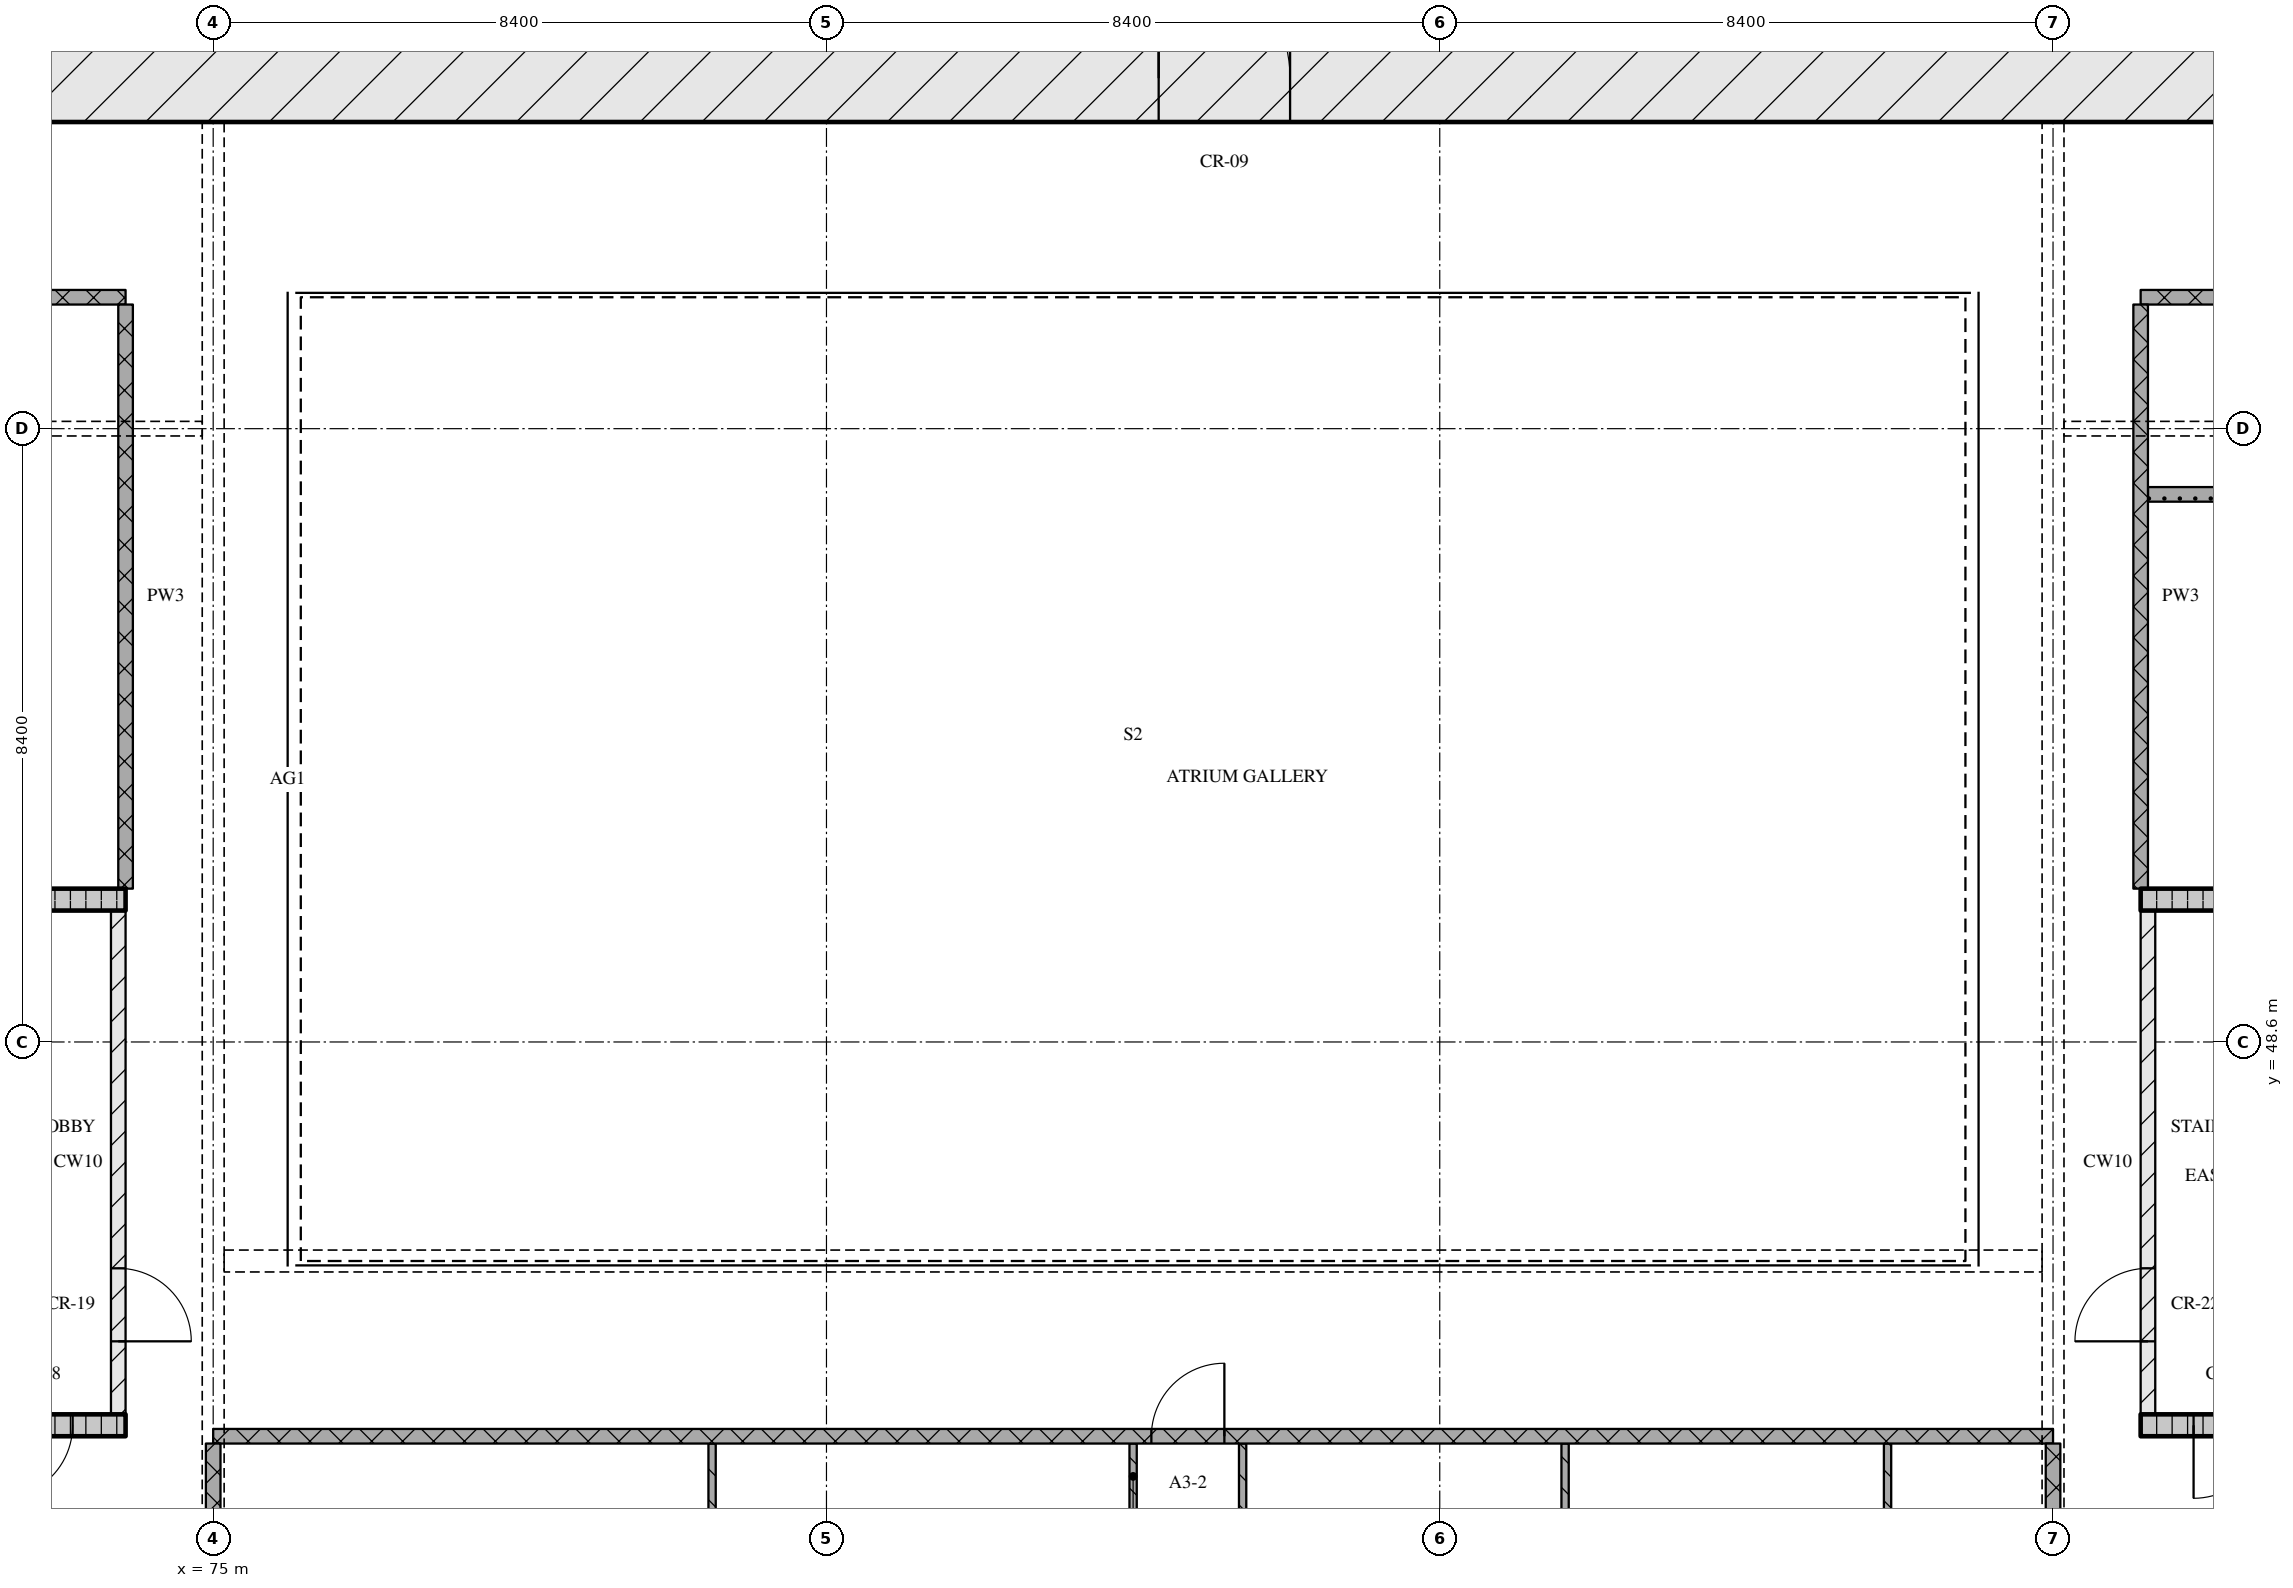
"""IFC4 building model, lengths in metres.
Left out: names, types, materials, properties, quantities, classifications, styles, units other than length and angle.
Written with IfcOpenShell. Run it as: python <this file> out.ifc"""

import sys

from ifc_helpers import new_model, si_unit, direction, frame, frame_2d, origin, place, context, subcontext, project, spatial, rectangle, extrude, element, fill, save


model = new_model("IFC4")
c1 = context("Model", 3, precision=1e-05, world=origin(), true_north=direction((0.0, 1.0)))
c2 = subcontext(c1, "Body", "Model", "MODEL_VIEW")
j1 = project(units=[si_unit("LENGTHUNIT", "METRE"), si_unit("PLANEANGLEUNIT", "RADIAN")], contexts=[c1])
p1 = place(None, origin())
s1 = spatial("IfcSite", under=j1, at=p1, CompositionType="ELEMENT")
p2 = place(p1, origin())
s2 = spatial("IfcBuilding", under=s1, at=p2, CompositionType="ELEMENT")
p3 = place(p2, frame((0.0, 0.0, 66.0)))
s3 = spatial("IfcBuildingStorey", under=s2, at=p3, CompositionType="ELEMENT", Elevation=66.0)
p4 = place(p3, frame((66.6, 61.8, 0.0), z_axis=(0.0, 0.0, 1.0), x_axis=(1.0, 0.0, 0.0)))
e1 = element("IfcWall", 1, at=p4, inside=s3, PredefinedType="SOLIDWALL", context=c2, shape_type="SweptSolid", body=[
    extrude(rectangle(XDim=42.0, YDim=1.2, at=frame_2d((21.0, 0.0))), origin(), (0.0, 0.0, 1.0), 3.32),
])
p5 = place(p4, frame((21.35, 0.0, 0.0)))
e2 = element("IfcOpeningElement", 2, at=p5, cuts=e1, PredefinedType="OPENING", context=c2, shape_type="SweptSolid", body=[
    extrude(rectangle(XDim=1.8, YDim=2.1, at=frame_2d((0.9, 1.05))), frame((0.0, 0.61, 0.0), z_axis=(0.0, -1.0, 0.0), x_axis=(1.0, 0.0, 0.0)), (0.0, 0.0, 1.0), 1.22),
])
p6 = place(p3, frame((68.2, 43.35, 0.0), z_axis=(0.0, 0.0, 1.0), x_axis=(1.0, 0.0, 0.0)))
e3 = element("IfcWall", 3, at=p6, inside=s3, PredefinedType="SOLIDWALL", context=c2, shape_type="SweptSolid", body=[
    extrude(rectangle(XDim=5.6, YDim=0.3, at=frame_2d((2.8, 0.0))), origin(), (0.0, 0.0, 1.0), 3.32),
])
p7 = place(p6, frame((3.875, 0.0, 0.0)))
e4 = element("IfcOpeningElement", 4, at=p7, cuts=e3, PredefinedType="OPENING", context=c2, shape_type="SweptSolid", body=[
    extrude(rectangle(XDim=1.0, YDim=2.1, at=frame_2d((0.5, 1.05))), frame((0.0, 0.16, 0.0), z_axis=(0.0, -1.0, 0.0), x_axis=(1.0, 0.0, 0.0)), (0.0, 0.0, 1.0), 0.32),
])
p8 = place(p3, frame((73.7, 43.5, 0.0), z_axis=(0.0, 0.0, 1.0), x_axis=(0.0, 1.0, 0.0)))
e5 = element("IfcWall", 5, at=p8, inside=s3, PredefinedType="PARTITIONING", context=c2, shape_type="SweptSolid", body=[
    extrude(rectangle(XDim=6.9, YDim=0.2, at=frame_2d((3.45, 0.0))), origin(), (0.0, 0.0, 1.0), 3.32),
])
p9 = place(p8, frame((1.0, 0.0, 0.0)))
e6 = element("IfcOpeningElement", 6, at=p9, cuts=e5, PredefinedType="OPENING", context=c2, shape_type="SweptSolid", body=[
    extrude(rectangle(XDim=1.0, YDim=2.1, at=frame_2d((0.5, 1.05))), frame((0.0, 0.11, 0.0), z_axis=(0.0, -1.0, 0.0), x_axis=(1.0, 0.0, 0.0)), (0.0, 0.0, 1.0), 0.22),
])
p10 = place(p3, frame((68.2, 50.55, 0.0), z_axis=(0.0, 0.0, 1.0), x_axis=(1.0, 0.0, 0.0)))
e7 = element("IfcWall", 7, at=p10, inside=s3, PredefinedType="SOLIDWALL", context=c2, shape_type="SweptSolid", body=[
    extrude(rectangle(XDim=5.6, YDim=0.3, at=frame_2d((2.8, 0.0))), origin(), (0.0, 0.0, 1.0), 3.32),
])
p11 = place(p3, frame((101.4, 43.35, 0.0), z_axis=(0.0, 0.0, 1.0), x_axis=(1.0, 0.0, 0.0)))
e8 = element("IfcWall", 8, at=p11, inside=s3, PredefinedType="SOLIDWALL", context=c2, shape_type="SweptSolid", body=[
    extrude(rectangle(XDim=5.6, YDim=0.3, at=frame_2d((2.8, 0.0))), origin(), (0.0, 0.0, 1.0), 3.32),
])
p12 = place(p11, frame((0.725, 0.0, 0.0)))
e9 = element("IfcOpeningElement", 9, at=p12, cuts=e8, PredefinedType="OPENING", context=c2, shape_type="SweptSolid", body=[
    extrude(rectangle(XDim=1.0, YDim=2.1, at=frame_2d((0.5, 1.05))), frame((0.0, 0.16, 0.0), z_axis=(0.0, -1.0, 0.0), x_axis=(1.0, 0.0, 0.0)), (0.0, 0.0, 1.0), 0.32),
])
p13 = place(p3, frame((101.5, 43.5, 0.0), z_axis=(0.0, 0.0, 1.0), x_axis=(0.0, 1.0, 0.0)))
e10 = element("IfcWall", 10, at=p13, inside=s3, PredefinedType="PARTITIONING", context=c2, shape_type="SweptSolid", body=[
    extrude(rectangle(XDim=6.9, YDim=0.2, at=frame_2d((3.45, 0.0))), origin(), (0.0, 0.0, 1.0), 3.32),
])
p14 = place(p13, frame((1.0, 0.0, 0.0)))
e11 = element("IfcOpeningElement", 11, at=p14, cuts=e10, PredefinedType="OPENING", context=c2, shape_type="SweptSolid", body=[
    extrude(rectangle(XDim=1.0, YDim=2.1, at=frame_2d((0.5, 1.05))), frame((0.0, 0.11, 0.0), z_axis=(0.0, -1.0, 0.0), x_axis=(1.0, 0.0, 0.0)), (0.0, 0.0, 1.0), 0.22),
])
p15 = place(p3, frame((101.4, 50.55, 0.0), z_axis=(0.0, 0.0, 1.0), x_axis=(1.0, 0.0, 0.0)))
e12 = element("IfcWall", 12, at=p15, inside=s3, PredefinedType="SOLIDWALL", context=c2, shape_type="SweptSolid", body=[
    extrude(rectangle(XDim=5.6, YDim=0.3, at=frame_2d((2.8, 0.0))), origin(), (0.0, 0.0, 1.0), 3.32),
])
p16 = place(p3, frame((100.2, 43.2, 0.0), z_axis=(0.0, 0.0, 1.0), x_axis=(-1.0, 0.0, 0.0)))
e13 = element("IfcWall", 13, at=p16, inside=s3, PredefinedType="PARTITIONING", context=c2, shape_type="SweptSolid", body=[
    extrude(rectangle(XDim=25.2, YDim=0.2, at=frame_2d((12.6, 0.0))), origin(), (0.0, 0.0, 1.0), 3.32),
])
p17 = place(p16, frame((11.35, 0.0, 0.0)))
e14 = element("IfcOpeningElement", 14, at=p17, cuts=e13, PredefinedType="OPENING", context=c2, shape_type="SweptSolid", body=[
    extrude(rectangle(XDim=1.0, YDim=2.1, at=frame_2d((0.5, 1.05))), frame((0.0, 0.11, 0.0), z_axis=(0.0, -1.0, 0.0), x_axis=(1.0, 0.0, 0.0)), (0.0, 0.0, 1.0), 0.22),
])
p18 = place(p3, frame((101.5, 56.1, 0.0), z_axis=(0.0, 0.0, 1.0), x_axis=(1.0, 0.0, 0.0)))
e15 = element("IfcWall", 15, at=p18, inside=s3, PredefinedType="PARTITIONING", context=c2, shape_type="SweptSolid", body=[
    extrude(rectangle(XDim=7.0, YDim=0.2, at=frame_2d((3.5, 0.0))), origin(), (0.0, 0.0, 1.0), 3.32),
])
p19 = place(p3, frame((73.8, 58.8, 0.0), z_axis=(0.0, 0.0, 1.0), x_axis=(-1.0, 0.0, 0.0)))
e16 = element("IfcWall", 16, at=p19, inside=s3, PredefinedType="PARTITIONING", context=c2, shape_type="SweptSolid", body=[
    extrude(rectangle(XDim=7.2, YDim=0.2, at=frame_2d((3.6, 0.0))), origin(), (0.0, 0.0, 1.0), 3.32),
])
p20 = place(p19, frame((3.0, 0.0, 0.0)))
e17 = element("IfcOpeningElement", 17, at=p20, cuts=e16, PredefinedType="OPENING", context=c2, shape_type="SweptSolid", body=[
    extrude(rectangle(XDim=1.2, YDim=2.1, at=frame_2d((0.6, 1.05))), frame((0.0, 0.11, 0.0), z_axis=(0.0, -1.0, 0.0), x_axis=(1.0, 0.0, 0.0)), (0.0, 0.0, 1.0), 0.22),
])
p21 = place(p3, frame((101.4, 58.8, 0.0), z_axis=(0.0, 0.0, 1.0), x_axis=(1.0, 0.0, 0.0)))
e18 = element("IfcWall", 18, at=p21, inside=s3, PredefinedType="PARTITIONING", context=c2, shape_type="SweptSolid", body=[
    extrude(rectangle(XDim=7.2, YDim=0.2, at=frame_2d((3.6, 0.0))), origin(), (0.0, 0.0, 1.0), 3.32),
])
p22 = place(p3, frame((73.8, 58.7, 0.0), z_axis=(0.0, 0.0, 1.0), x_axis=(0.0, -1.0, 0.0)))
e19 = element("IfcWall", 19, at=p22, inside=s3, PredefinedType="PARTITIONING", context=c2, shape_type="SweptSolid", body=[
    extrude(rectangle(XDim=8.0, YDim=0.2, at=frame_2d((4.0, 0.0))), origin(), (0.0, 0.0, 1.0), 3.32),
])
p23 = place(p3, frame((75.0, 43.1, 0.0), z_axis=(0.0, 0.0, 1.0), x_axis=(0.0, -1.0, 0.0)))
e20 = element("IfcWall", 20, at=p23, inside=s3, PredefinedType="PARTITIONING", context=c2, shape_type="SweptSolid", body=[
    extrude(rectangle(XDim=2.2, YDim=0.2, at=frame_2d((1.1, 0.0))), origin(), (0.0, 0.0, 1.0), 2.43),
])
p24 = place(p3, frame((81.833, 43.1, 0.0), z_axis=(0.0, 0.0, 1.0), x_axis=(0.0, -1.0, 0.0)))
e21 = element("IfcWall", 21, at=p24, inside=s3, PredefinedType="PARTITIONING", context=c2, shape_type="SweptSolid", body=[
    extrude(rectangle(XDim=5.85, YDim=0.1, at=frame_2d((2.925, 0.0))), origin(), (0.0, 0.0, 1.0), 3.32),
])
p25 = place(p3, frame((87.6, 37.25, 0.0), z_axis=(0.0, 0.0, 1.0), x_axis=(0.0, 1.0, 0.0)))
e22 = element("IfcWall", 22, at=p25, inside=s3, PredefinedType="PARTITIONING", context=c2, shape_type="SweptSolid", body=[
    extrude(rectangle(XDim=5.85, YDim=0.1, at=frame_2d((2.925, 0.0))), origin(), (0.0, 0.0, 1.0), 3.32),
])
p26 = place(p25, frame((2.5, 0.0, 0.0)))
e23 = element("IfcOpeningElement", 23, at=p26, cuts=e22, PredefinedType="OPENING", context=c2, shape_type="SweptSolid", body=[
    extrude(rectangle(XDim=0.9, YDim=2.1, at=frame_2d((0.45, 1.05))), frame((0.0, 0.06, 0.0), z_axis=(0.0, -1.0, 0.0), x_axis=(1.0, 0.0, 0.0)), (0.0, 0.0, 1.0), 0.12),
])
p27 = place(p3, frame((89.1, 43.1, 0.0), z_axis=(0.0, 0.0, 1.0), x_axis=(0.0, -1.0, 0.0)))
e24 = element("IfcWall", 24, at=p27, inside=s3, PredefinedType="PARTITIONING", context=c2, shape_type="SweptSolid", body=[
    extrude(rectangle(XDim=5.85, YDim=0.1, at=frame_2d((2.925, 0.0))), origin(), (0.0, 0.0, 1.0), 3.32),
])
p28 = place(p27, frame((2.5, 0.0, 0.0)))
e25 = element("IfcOpeningElement", 25, at=p28, cuts=e24, PredefinedType="OPENING", context=c2, shape_type="SweptSolid", body=[
    extrude(rectangle(XDim=0.8, YDim=2.1, at=frame_2d((0.4, 1.05))), frame((0.0, 0.06, 0.0), z_axis=(0.0, -1.0, 0.0), x_axis=(1.0, 0.0, 0.0)), (0.0, 0.0, 1.0), 0.12),
])
for number, where, z_axis, x_axis in (
    (26, (93.517, 43.1, 0.0), (0.0, 0.0, 1.0), (0.0, -1.0, 0.0)),
    (27, (97.933, 43.1, 0.0), (0.0, 0.0, 1.0), (0.0, -1.0, 0.0)),
):
    element("IfcWall", number, at=place(p3, frame(where, z_axis=z_axis, x_axis=x_axis)), inside=s3, PredefinedType="PARTITIONING", context=c2, shape_type="SweptSolid", body=[
        extrude(rectangle(XDim=5.85, YDim=0.1, at=frame_2d((2.925, 0.0))), origin(), (0.0, 0.0, 1.0), 3.32),
    ])
p29 = place(p3, frame((100.2, 43.1, 0.0), z_axis=(0.0, 0.0, 1.0), x_axis=(0.0, -1.0, 0.0)))
e28 = element("IfcWall", 28, at=p29, inside=s3, PredefinedType="PARTITIONING", context=c2, shape_type="SweptSolid", body=[
    extrude(rectangle(XDim=2.2, YDim=0.2, at=frame_2d((1.1, 0.0))), origin(), (0.0, 0.0, 1.0), 2.43),
])
p30 = place(p3, frame((101.4, 58.7, 0.0), z_axis=(0.0, 0.0, 1.0), x_axis=(0.0, -1.0, 0.0)))
e29 = element("IfcWall", 29, at=p30, inside=s3, PredefinedType="PARTITIONING", context=c2, shape_type="SweptSolid", body=[
    extrude(rectangle(XDim=8.0, YDim=0.2, at=frame_2d((4.0, 0.0))), origin(), (0.0, 0.0, 1.0), 3.32),
])
p31 = place(p5, origin())
e30 = element("IfcDoor", 30, at=p31, inside=s3, OperationType="DOUBLE_DOOR_SINGLE_SWING", PredefinedType="DOOR", context=c2, shape_type="SweptSolid", body=[
    extrude(rectangle(XDim=1.8, YDim=2.1, at=frame_2d((0.9, 1.05))), frame((0.0, 0.025, 0.0), z_axis=(0.0, -1.0, 0.0), x_axis=(1.0, 0.0, 0.0)), (0.0, 0.0, 1.0), 0.05),
])
fill(e2, e30)
p32 = place(p7, origin())
e31 = element("IfcDoor", 31, at=p32, inside=s3, OperationType="SINGLE_SWING_RIGHT", PredefinedType="DOOR", context=c2, shape_type="SweptSolid", body=[
    extrude(rectangle(XDim=1.0, YDim=2.1, at=frame_2d((0.5, 1.05))), frame((0.0, 0.025, 0.0), z_axis=(0.0, -1.0, 0.0), x_axis=(1.0, 0.0, 0.0)), (0.0, 0.0, 1.0), 0.05),
])
fill(e4, e31)
p33 = place(p9, origin())
e32 = element("IfcDoor", 32, at=p33, inside=s3, OperationType="SINGLE_SWING_RIGHT", PredefinedType="DOOR", context=c2, shape_type="SweptSolid", body=[
    extrude(rectangle(XDim=1.0, YDim=2.1, at=frame_2d((0.5, 1.05))), frame((0.0, 0.025, 0.0), z_axis=(0.0, -1.0, 0.0), x_axis=(1.0, 0.0, 0.0)), (0.0, 0.0, 1.0), 0.05),
])
fill(e6, e32)
p34 = place(p12, origin())
e33 = element("IfcDoor", 33, at=p34, inside=s3, OperationType="SINGLE_SWING_RIGHT", PredefinedType="DOOR", context=c2, shape_type="SweptSolid", body=[
    extrude(rectangle(XDim=1.0, YDim=2.1, at=frame_2d((0.5, 1.05))), frame((0.0, 0.025, 0.0), z_axis=(0.0, -1.0, 0.0), x_axis=(1.0, 0.0, 0.0)), (0.0, 0.0, 1.0), 0.05),
])
fill(e9, e33)
p35 = place(p14, origin())
e34 = element("IfcDoor", 34, at=p35, inside=s3, OperationType="SINGLE_SWING_LEFT", PredefinedType="DOOR", context=c2, shape_type="SweptSolid", body=[
    extrude(rectangle(XDim=1.0, YDim=2.1, at=frame_2d((0.5, 1.05))), frame((0.0, 0.025, 0.0), z_axis=(0.0, -1.0, 0.0), x_axis=(1.0, 0.0, 0.0)), (0.0, 0.0, 1.0), 0.05),
])
fill(e11, e34)
p36 = place(p17, origin())
e35 = element("IfcDoor", 35, at=p36, inside=s3, OperationType="SINGLE_SWING_RIGHT", PredefinedType="DOOR", context=c2, shape_type="SweptSolid", body=[
    extrude(rectangle(XDim=1.0, YDim=2.1, at=frame_2d((0.5, 1.05))), frame((0.0, 0.025, 0.0), z_axis=(0.0, -1.0, 0.0), x_axis=(1.0, 0.0, 0.0)), (0.0, 0.0, 1.0), 0.05),
])
fill(e14, e35)
save(model, sys.argv[1])
